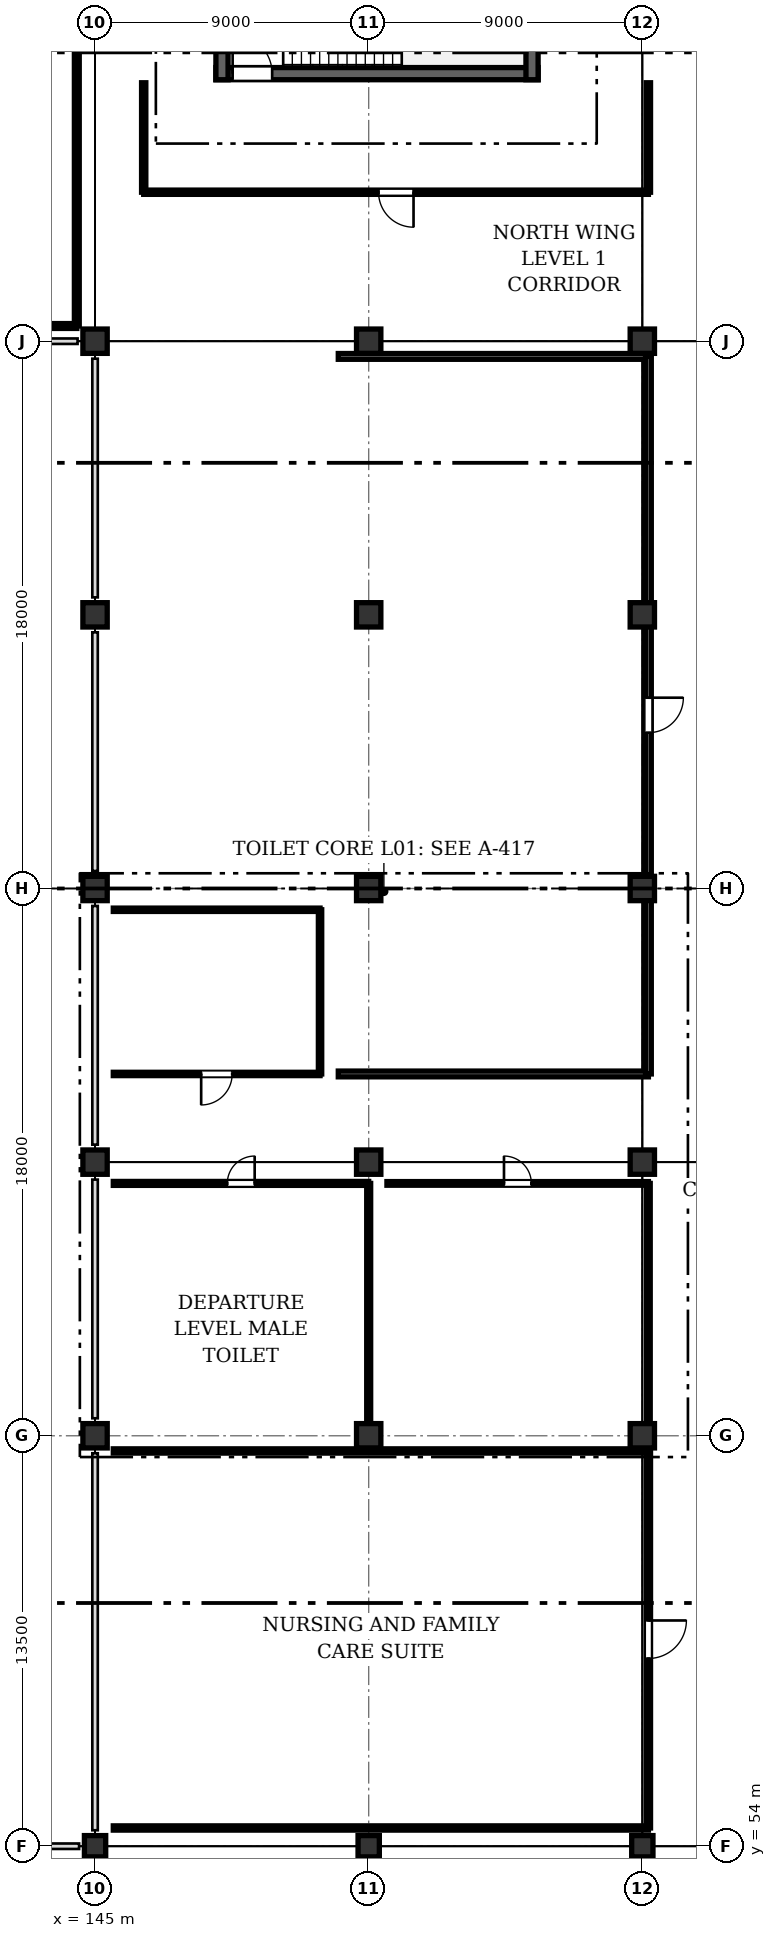
"""IFC4 building model, lengths in metres.
Left out: names, types, materials, properties, quantities, classifications, styles, units other than length and angle.
Written with IfcOpenShell. Run it as: python <this file> out.ifc"""

import sys

from ifc_helpers import new_model, si_unit, direction, frame, frame_2d, origin, origin_2d, place, context, subcontext, project, spatial, rectangle, extrude, element, fill, save


model = new_model("IFC4")
c1 = context("Model", 3, precision=1e-05, world=origin(), true_north=direction((0.0, 1.0)))
c2 = subcontext(c1, "Body", "Model", "MODEL_VIEW")
j1 = project(units=[si_unit("LENGTHUNIT", "METRE"), si_unit("PLANEANGLEUNIT", "RADIAN")], contexts=[c1])
p1 = place(None, origin())
s1 = spatial("IfcSite", under=j1, at=p1, CompositionType="ELEMENT")
p2 = place(p1, origin())
s2 = spatial("IfcBuilding", under=s1, at=p2, CompositionType="ELEMENT")
p3 = place(p2, frame((0.0, 0.0, 6.6)))
s3 = spatial("IfcBuildingStorey", under=s2, at=p3, CompositionType="ELEMENT", Elevation=6.6)
p4 = place(p3, frame((145.0, 54.0, 0.0), z_axis=(0.0, 0.0, 1.0), x_axis=(1.0, 0.0, 0.0)))
e1 = element("IfcColumn", 1, at=p4, inside=s3, PredefinedType="COLUMN", context=c2, shape_type="SweptSolid", body=[
    extrude(rectangle(XDim=0.7, YDim=0.7, at=origin_2d()), origin(), (0.0, 0.0, 1.0), 4.2),
])
for number, where, z_axis, x_axis in (
    (2, (145.0, 67.5, 0.0), (0.0, 0.0, 1.0), (1.0, 0.0, 0.0)),
    (3, (145.0, 76.5, 0.0), (0.0, 0.0, 1.0), (1.0, 0.0, 0.0)),
    (4, (145.0, 85.5, 0.0), (0.0, 0.0, 1.0), (1.0, 0.0, 0.0)),
    (5, (145.0, 94.5, 0.0), (0.0, 0.0, 1.0), (1.0, 0.0, 0.0)),
    (6, (145.0, 103.5, 0.0), (0.0, 0.0, 1.0), (1.0, 0.0, 0.0)),
):
    element("IfcColumn", number, at=place(p3, frame(where, z_axis=z_axis, x_axis=x_axis)), inside=s3, PredefinedType="COLUMN", context=c2, shape_type="SweptSolid", body=[
        extrude(rectangle(XDim=0.8, YDim=0.8, at=origin_2d()), origin(), (0.0, 0.0, 1.0), 4.2),
    ])
p5 = place(p3, frame((154.0, 54.0, 0.0), z_axis=(0.0, 0.0, 1.0), x_axis=(1.0, 0.0, 0.0)))
e7 = element("IfcColumn", 7, at=p5, inside=s3, PredefinedType="COLUMN", context=c2, shape_type="SweptSolid", body=[
    extrude(rectangle(XDim=0.7, YDim=0.7, at=origin_2d()), origin(), (0.0, 0.0, 1.0), 4.2),
])
for number, where, z_axis, x_axis in (
    (8, (154.0, 67.5, 0.0), (0.0, 0.0, 1.0), (1.0, 0.0, 0.0)),
    (9, (154.0, 76.5, 0.0), (0.0, 0.0, 1.0), (1.0, 0.0, 0.0)),
    (10, (154.0, 85.5, 0.0), (0.0, 0.0, 1.0), (1.0, 0.0, 0.0)),
    (11, (154.0, 94.5, 0.0), (0.0, 0.0, 1.0), (1.0, 0.0, 0.0)),
    (12, (154.0, 103.5, 0.0), (0.0, 0.0, 1.0), (1.0, 0.0, 0.0)),
):
    element("IfcColumn", number, at=place(p3, frame(where, z_axis=z_axis, x_axis=x_axis)), inside=s3, PredefinedType="COLUMN", context=c2, shape_type="SweptSolid", body=[
        extrude(rectangle(XDim=0.8, YDim=0.8, at=origin_2d()), origin(), (0.0, 0.0, 1.0), 4.2),
    ])
p6 = place(p3, frame((163.0, 54.0, 0.0), z_axis=(0.0, 0.0, 1.0), x_axis=(1.0, 0.0, 0.0)))
e13 = element("IfcColumn", 13, at=p6, inside=s3, PredefinedType="COLUMN", context=c2, shape_type="SweptSolid", body=[
    extrude(rectangle(XDim=0.7, YDim=0.7, at=origin_2d()), origin(), (0.0, 0.0, 1.0), 4.2),
])
for number, where, z_axis, x_axis in (
    (14, (163.0, 67.5, 0.0), (0.0, 0.0, 1.0), (1.0, 0.0, 0.0)),
    (15, (163.0, 76.5, 0.0), (0.0, 0.0, 1.0), (1.0, 0.0, 0.0)),
    (16, (163.0, 85.5, 0.0), (0.0, 0.0, 1.0), (1.0, 0.0, 0.0)),
    (17, (163.0, 94.5, 0.0), (0.0, 0.0, 1.0), (1.0, 0.0, 0.0)),
    (18, (163.0, 103.5, 0.0), (0.0, 0.0, 1.0), (1.0, 0.0, 0.0)),
):
    element("IfcColumn", number, at=place(p3, frame(where, z_axis=z_axis, x_axis=x_axis)), inside=s3, PredefinedType="COLUMN", context=c2, shape_type="SweptSolid", body=[
        extrude(rectangle(XDim=0.8, YDim=0.8, at=origin_2d()), origin(), (0.0, 0.0, 1.0), 4.2),
    ])
p7 = place(p3, frame((148.975, 112.3, 0.0), z_axis=(0.0, 0.0, 1.0), x_axis=(1.0, 0.0, 0.0)))
e19 = element("IfcWall", 19, at=p7, inside=s3, PredefinedType="SHEAR", context=c2, shape_type="SweptSolid", body=[
    extrude(rectangle(XDim=10.597, YDim=0.4, at=frame_2d((5.299, 0.0))), origin(), (0.0, 0.0, 1.0), 3.98),
])
p8 = place(p7, frame((0.55, 0.0, 0.0)))
e20 = element("IfcOpeningElement", 20, at=p8, cuts=e19, PredefinedType="OPENING", context=c2, shape_type="SweptSolid", body=[
    extrude(rectangle(XDim=1.3, YDim=2.1, at=frame_2d((0.65, 1.05))), frame((0.0, 0.21, 0.0), z_axis=(0.0, -1.0, 0.0), x_axis=(1.0, 0.0, 0.0)), (0.0, 0.0, 1.0), 0.42),
])
for number, where, z_axis, x_axis in (
    (21, (159.373, 112.1, 0.0), (0.0, 0.0, 1.0), (0.0, 1.0, 0.0)),
    (22, (149.175, 116.52, 0.0), (0.0, 0.0, 1.0), (0.0, -1.0, 0.0)),
):
    element("IfcWall", number, at=place(p3, frame(where, z_axis=z_axis, x_axis=x_axis)), inside=s3, PredefinedType="SHEAR", context=c2, shape_type="SweptSolid", body=[
        extrude(rectangle(XDim=4.42, YDim=0.4, at=frame_2d((2.21, 0.0))), origin(), (0.0, 0.0, 1.0), 3.98),
    ])
p9 = place(p3, frame((144.4, 104.0, 0.0), z_axis=(0.0, 0.0, 1.0), x_axis=(-1.0, 0.0, 0.0)))
e23 = element("IfcWall", 23, at=p9, inside=s3, PredefinedType="PARTITIONING", context=c2, shape_type="SweptSolid", body=[
    extrude(rectangle(XDim=26.8, YDim=0.16, at=frame_2d((13.4, 0.0))), origin(), (0.0, 0.0, 1.0), 3.355),
])
p10 = place(p3, frame((144.4, 125.4, 0.0), z_axis=(0.0, 0.0, 1.0), x_axis=(0.0, -1.0, 0.0)))
e24 = element("IfcWall", 24, at=p10, inside=s3, PredefinedType="PARTITIONING", context=c2, shape_type="SweptSolid", body=[
    extrude(rectangle(XDim=21.4, YDim=0.16, at=frame_2d((10.7, 0.0))), origin(), (0.0, 0.0, 1.0), 3.355),
])
p11 = place(p10, frame((9.925, 0.0, 0.0)))
e25 = element("IfcOpeningElement", 25, at=p11, cuts=e24, PredefinedType="OPENING", context=c2, shape_type="SweptSolid", body=[
    extrude(rectangle(XDim=1.55, YDim=2.1, at=frame_2d((0.775, 1.05))), frame((0.0, 0.09, 0.0), z_axis=(0.0, -1.0, 0.0), x_axis=(1.0, 0.0, 0.0)), (0.0, 0.0, 1.0), 0.18),
])
for number, where, z_axis, x_axis in (
    (26, (163.2, 54.6, 0.0), (0.0, 0.0, 1.0), (-1.0, 0.0, 0.0)),
    (27, (145.6, 67.0, 0.0), (0.0, 0.0, 1.0), (1.0, 0.0, 0.0)),
):
    element("IfcWall", number, at=place(p3, frame(where, z_axis=z_axis, x_axis=x_axis)), inside=s3, PredefinedType="PARTITIONING", context=c2, shape_type="SweptSolid", body=[
        extrude(rectangle(XDim=17.6, YDim=0.14, at=frame_2d((8.8, 0.0))), origin(), (0.0, 0.0, 1.0), 3.37),
    ])
p12 = place(p3, frame((163.2, 67.0, 0.0), z_axis=(0.0, 0.0, 1.0), x_axis=(0.0, -1.0, 0.0)))
e28 = element("IfcWall", 28, at=p12, inside=s3, PredefinedType="PARTITIONING", context=c2, shape_type="SweptSolid", body=[
    extrude(rectangle(XDim=12.4, YDim=0.14, at=frame_2d((6.2, 0.0))), origin(), (0.0, 0.0, 1.0), 3.37),
])
p13 = place(p12, frame((5.575, 0.0, 0.0)))
e29 = element("IfcOpeningElement", 29, at=p13, cuts=e28, PredefinedType="OPENING", context=c2, shape_type="SweptSolid", body=[
    extrude(rectangle(XDim=1.25, YDim=2.1, at=frame_2d((0.625, 1.05))), frame((0.0, 0.08, 0.0), z_axis=(0.0, -1.0, 0.0), x_axis=(1.0, 0.0, 0.0)), (0.0, 0.0, 1.0), 0.16),
])
p14 = place(p3, frame((145.6, 75.8, 0.0), z_axis=(0.0, 0.0, 1.0), x_axis=(1.0, 0.0, 0.0)))
e30 = element("IfcWall", 30, at=p14, inside=s3, PredefinedType="PARTITIONING", context=c2, shape_type="SweptSolid", body=[
    extrude(rectangle(XDim=8.4, YDim=0.13, at=frame_2d((4.2, 0.0))), origin(), (0.0, 0.0, 1.0), 3.515),
])
p15 = place(p14, frame((3.75, 0.0, 0.0)))
e31 = element("IfcOpeningElement", 31, at=p15, cuts=e30, PredefinedType="OPENING", context=c2, shape_type="SweptSolid", body=[
    extrude(rectangle(XDim=0.9, YDim=2.1, at=frame_2d((0.45, 1.05))), frame((0.0, 0.075, 0.0), z_axis=(0.0, -1.0, 0.0), x_axis=(1.0, 0.0, 0.0)), (0.0, 0.0, 1.0), 0.15),
])
p16 = place(p3, frame((154.0, 75.8, 0.0), z_axis=(0.0, 0.0, 1.0), x_axis=(0.0, -1.0, 0.0)))
e32 = element("IfcWall", 32, at=p16, inside=s3, PredefinedType="PARTITIONING", context=c2, shape_type="SweptSolid", body=[
    extrude(rectangle(XDim=8.2, YDim=0.13, at=frame_2d((4.1, 0.0))), origin(), (0.0, 0.0, 1.0), 3.37),
])
p17 = place(p3, frame((154.6, 75.8, 0.0), z_axis=(0.0, 0.0, 1.0), x_axis=(1.0, 0.0, 0.0)))
e33 = element("IfcWall", 33, at=p17, inside=s3, PredefinedType="PARTITIONING", context=c2, shape_type="SweptSolid", body=[
    extrude(rectangle(XDim=8.6, YDim=0.12, at=frame_2d((4.3, 0.0))), origin(), (0.0, 0.0, 1.0), 3.515),
])
p18 = place(p17, frame((3.85, 0.0, 0.0)))
e34 = element("IfcOpeningElement", 34, at=p18, cuts=e33, PredefinedType="OPENING", context=c2, shape_type="SweptSolid", body=[
    extrude(rectangle(XDim=0.9, YDim=2.1, at=frame_2d((0.45, 1.05))), frame((0.0, 0.07, 0.0), z_axis=(0.0, -1.0, 0.0), x_axis=(1.0, 0.0, 0.0)), (0.0, 0.0, 1.0), 0.14),
])
p19 = place(p3, frame((163.2, 75.8, 0.0), z_axis=(0.0, 0.0, 1.0), x_axis=(0.0, -1.0, 0.0)))
e35 = element("IfcWall", 35, at=p19, inside=s3, PredefinedType="PARTITIONING", context=c2, shape_type="SweptSolid", body=[
    extrude(rectangle(XDim=8.2, YDim=0.12, at=frame_2d((4.1, 0.0))), origin(), (0.0, 0.0, 1.0), 3.37),
])
p20 = place(p3, frame((152.4, 79.4, 0.0), z_axis=(0.0, 0.0, 1.0), x_axis=(-1.0, 0.0, 0.0)))
e36 = element("IfcWall", 36, at=p20, inside=s3, PredefinedType="PARTITIONING", context=c2, shape_type="SweptSolid", body=[
    extrude(rectangle(XDim=6.8, YDim=0.11, at=frame_2d((3.4, 0.0))), origin(), (0.0, 0.0, 1.0), 3.565),
])
p21 = place(p20, frame((2.89, 0.0, 0.0)))
e37 = element("IfcOpeningElement", 37, at=p21, cuts=e36, PredefinedType="OPENING", context=c2, shape_type="SweptSolid", body=[
    extrude(rectangle(XDim=1.02, YDim=2.05, at=frame_2d((0.51, 1.025))), frame((0.0, 0.065, 0.0), z_axis=(0.0, -1.0, 0.0), x_axis=(1.0, 0.0, 0.0)), (0.0, 0.0, 1.0), 0.13),
])
p22 = place(p3, frame((145.6, 84.8, 0.0), z_axis=(0.0, 0.0, 1.0), x_axis=(1.0, 0.0, 0.0)))
e38 = element("IfcWall", 38, at=p22, inside=s3, PredefinedType="PARTITIONING", context=c2, shape_type="SweptSolid", body=[
    extrude(rectangle(XDim=6.8, YDim=0.11, at=frame_2d((3.4, 0.0))), origin(), (0.0, 0.0, 1.0), 3.515),
])
p23 = place(p3, frame((152.4, 84.8, 0.0), z_axis=(0.0, 0.0, 1.0), x_axis=(0.0, -1.0, 0.0)))
e39 = element("IfcWall", 39, at=p23, inside=s3, PredefinedType="PARTITIONING", context=c2, shape_type="SweptSolid", body=[
    extrude(rectangle(XDim=5.4, YDim=0.11, at=frame_2d((2.7, 0.0))), origin(), (0.0, 0.0, 1.0), 3.515),
])
p24 = place(p3, frame((163.2, 79.4, 0.0), z_axis=(0.0, 0.0, 1.0), x_axis=(-1.0, 0.0, 0.0)))
e40 = element("IfcWall", 40, at=p24, inside=s3, PredefinedType="PARTITIONING", context=c2, shape_type="SweptSolid", body=[
    extrude(rectangle(XDim=10.2, YDim=0.19, at=frame_2d((5.1, 0.0))), origin(), (0.0, 0.0, 1.0), 3.565),
])
p25 = place(p3, frame((153.0, 103.0, 0.0), z_axis=(0.0, 0.0, 1.0), x_axis=(1.0, 0.0, 0.0)))
e41 = element("IfcWall", 41, at=p25, inside=s3, PredefinedType="PARTITIONING", context=c2, shape_type="SweptSolid", body=[
    extrude(rectangle(XDim=10.2, YDim=0.19, at=frame_2d((5.1, 0.0))), origin(), (0.0, 0.0, 1.0), 3.355),
])
p26 = place(p3, frame((163.2, 103.0, 0.0), z_axis=(0.0, 0.0, 1.0), x_axis=(0.0, -1.0, 0.0)))
e42 = element("IfcWall", 42, at=p26, inside=s3, PredefinedType="PARTITIONING", context=c2, shape_type="SweptSolid", body=[
    extrude(rectangle(XDim=23.6, YDim=0.19, at=frame_2d((11.8, 0.0))), origin(), (0.0, 0.0, 1.0), 3.355),
])
p27 = place(p26, frame((11.225, 0.0, 0.0)))
e43 = element("IfcOpeningElement", 43, at=p27, cuts=e42, PredefinedType="OPENING", context=c2, shape_type="SweptSolid", body=[
    extrude(rectangle(XDim=1.15, YDim=2.1, at=frame_2d((0.575, 1.05))), frame((0.0, 0.105, 0.0), z_axis=(0.0, -1.0, 0.0), x_axis=(1.0, 0.0, 0.0)), (0.0, 0.0, 1.0), 0.21),
])
p28 = place(p3, frame((163.2, 108.4, 0.0), z_axis=(0.0, 0.0, 1.0), x_axis=(-1.0, 0.0, 0.0)))
e44 = element("IfcWall", 44, at=p28, inside=s3, PredefinedType="PARTITIONING", context=c2, shape_type="SweptSolid", body=[
    extrude(rectangle(XDim=16.6, YDim=0.14, at=frame_2d((8.3, 0.0))), origin(), (0.0, 0.0, 1.0), 3.355),
])
p29 = place(p28, frame((7.725, 0.0, 0.0)))
e45 = element("IfcOpeningElement", 45, at=p29, cuts=e44, PredefinedType="OPENING", context=c2, shape_type="SweptSolid", body=[
    extrude(rectangle(XDim=1.15, YDim=2.1, at=frame_2d((0.575, 1.05))), frame((0.0, 0.08, 0.0), z_axis=(0.0, -1.0, 0.0), x_axis=(1.0, 0.0, 0.0)), (0.0, 0.0, 1.0), 0.16),
])
p30 = place(p3, frame((146.6, 108.4, 0.0), z_axis=(0.0, 0.0, 1.0), x_axis=(0.0, 1.0, 0.0)))
e46 = element("IfcWall", 46, at=p30, inside=s3, PredefinedType="PARTITIONING", context=c2, shape_type="SweptSolid", body=[
    extrude(rectangle(XDim=3.6, YDim=0.14, at=frame_2d((1.8, 0.0))), origin(), (0.0, 0.0, 1.0), 3.955),
])
p31 = place(p3, frame((163.2, 112.0, 0.0), z_axis=(0.0, 0.0, 1.0), x_axis=(0.0, -1.0, 0.0)))
e47 = element("IfcWall", 47, at=p31, inside=s3, PredefinedType="PARTITIONING", context=c2, shape_type="SweptSolid", body=[
    extrude(rectangle(XDim=3.6, YDim=0.14, at=frame_2d((1.8, 0.0))), origin(), (0.0, 0.0, 1.0), 3.355),
])
p32 = place(p8, origin())
e48 = element("IfcDoor", 48, at=p32, inside=s3, OperationType="SINGLE_SWING_LEFT", PredefinedType="DOOR", context=c2, shape_type="SweptSolid", body=[
    extrude(rectangle(XDim=1.3, YDim=2.1, at=frame_2d((0.65, 1.05))), frame((0.0, 0.025, 0.0), z_axis=(0.0, -1.0, 0.0), x_axis=(1.0, 0.0, 0.0)), (0.0, 0.0, 1.0), 0.05),
])
fill(e20, e48)
p33 = place(p13, origin())
e49 = element("IfcDoor", 49, at=p33, inside=s3, OperationType="SINGLE_SWING_LEFT", PredefinedType="DOOR", context=c2, shape_type="SweptSolid", body=[
    extrude(rectangle(XDim=1.25, YDim=2.1, at=frame_2d((0.625, 1.05))), frame((0.0, 0.025, 0.0), z_axis=(0.0, -1.0, 0.0), x_axis=(1.0, 0.0, 0.0)), (0.0, 0.0, 1.0), 0.05),
])
fill(e29, e49)
p34 = place(p15, origin())
e50 = element("IfcDoor", 50, at=p34, inside=s3, OperationType="SINGLE_SWING_RIGHT", PredefinedType="DOOR", context=c2, shape_type="SweptSolid", body=[
    extrude(rectangle(XDim=0.9, YDim=2.1, at=frame_2d((0.45, 1.05))), frame((0.0, 0.025, 0.0), z_axis=(0.0, -1.0, 0.0), x_axis=(1.0, 0.0, 0.0)), (0.0, 0.0, 1.0), 0.05),
])
fill(e31, e50)
p35 = place(p18, origin())
e51 = element("IfcDoor", 51, at=p35, inside=s3, OperationType="SINGLE_SWING_LEFT", PredefinedType="DOOR", context=c2, shape_type="SweptSolid", body=[
    extrude(rectangle(XDim=0.9, YDim=2.1, at=frame_2d((0.45, 1.05))), frame((0.0, 0.025, 0.0), z_axis=(0.0, -1.0, 0.0), x_axis=(1.0, 0.0, 0.0)), (0.0, 0.0, 1.0), 0.05),
])
fill(e34, e51)
p36 = place(p21, origin())
e52 = element("IfcDoor", 52, at=p36, inside=s3, OperationType="SINGLE_SWING_RIGHT", PredefinedType="DOOR", context=c2, shape_type="SweptSolid", body=[
    extrude(rectangle(XDim=1.02, YDim=2.05, at=frame_2d((0.51, 1.025))), frame((0.0, 0.025, 0.0), z_axis=(0.0, -1.0, 0.0), x_axis=(1.0, 0.0, 0.0)), (0.0, 0.0, 1.0), 0.05),
])
fill(e37, e52)
p37 = place(p27, origin())
e53 = element("IfcDoor", 53, at=p37, inside=s3, OperationType="SINGLE_SWING_LEFT", PredefinedType="DOOR", context=c2, shape_type="SweptSolid", body=[
    extrude(rectangle(XDim=1.15, YDim=2.1, at=frame_2d((0.575, 1.05))), frame((0.0, 0.025, 0.0), z_axis=(0.0, -1.0, 0.0), x_axis=(1.0, 0.0, 0.0)), (0.0, 0.0, 1.0), 0.05),
])
fill(e43, e53)
p38 = place(p29, origin())
e54 = element("IfcDoor", 54, at=p38, inside=s3, OperationType="SINGLE_SWING_LEFT", PredefinedType="DOOR", context=c2, shape_type="SweptSolid", body=[
    extrude(rectangle(XDim=1.15, YDim=2.1, at=frame_2d((0.575, 1.05))), frame((0.0, 0.025, 0.0), z_axis=(0.0, -1.0, 0.0), x_axis=(1.0, 0.0, 0.0)), (0.0, 0.0, 1.0), 0.05),
])
fill(e45, e54)
save(model, sys.argv[1])
